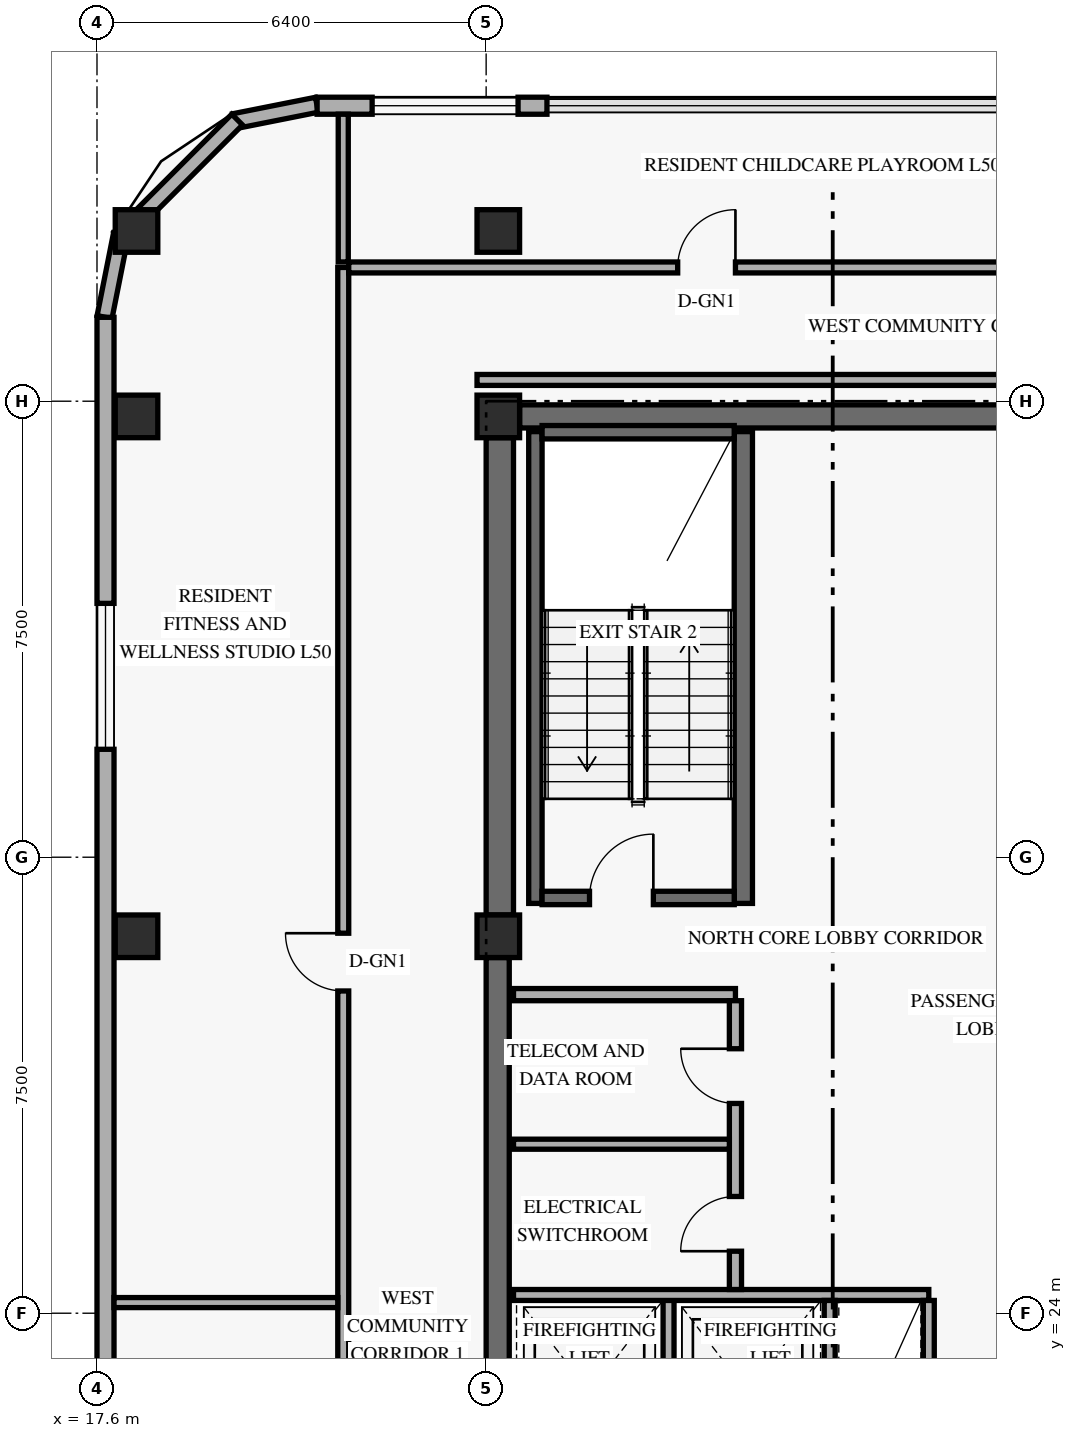
"""IFC4 building model, lengths in metres.
Left out: names, types, materials, properties, quantities, classifications, styles, units other than length and angle.
Written with IfcOpenShell. Run it as: python <this file> out.ifc"""

import sys

from ifc_helpers import new_model, si_unit, direction, frame, frame_2d, origin, origin_2d, place, context, subcontext, project, spatial, rectangle, extrude, element, fill, save


model = new_model("IFC4")
c1 = context("Model", 3, precision=1e-05, world=origin(), true_north=direction((0.0, 1.0)))
c2 = subcontext(c1, "Body", "Model", "MODEL_VIEW")
j1 = project(units=[si_unit("LENGTHUNIT", "METRE"), si_unit("PLANEANGLEUNIT", "RADIAN")], contexts=[c1])
p1 = place(None, origin())
s1 = spatial("IfcSite", under=j1, at=p1, CompositionType="ELEMENT")
p2 = place(p1, origin())
s2 = spatial("IfcBuilding", under=s1, at=p2, CompositionType="ELEMENT")
p3 = place(p2, frame((0.0, 0.0, 192.0)))
s3 = spatial("IfcBuildingStorey", under=s2, at=p3, CompositionType="ELEMENT", Elevation=192.0)
p4 = place(p3, frame((24.19, 17.9, 0.0), z_axis=(0.0, 0.0, 1.0), x_axis=(0.0, 1.0, 0.0)))
e1 = element("IfcWall", 1, at=p4, inside=s3, PredefinedType="SHEAR", context=c2, shape_type="SweptSolid", body=[
    extrude(rectangle(XDim=11.95, YDim=0.38, at=frame_2d((5.975, 0.0))), origin(), (0.0, 0.0, 1.0), 3.348),
])
p5 = place(p3, frame((24.225, 30.55, 0.0), z_axis=(0.0, 0.0, 1.0), x_axis=(0.0, 1.0, 0.0)))
e2 = element("IfcWall", 2, at=p5, inside=s3, PredefinedType="SHEAR", context=c2, shape_type="SweptSolid", body=[
    extrude(rectangle(XDim=7.85, YDim=0.45, at=frame_2d((3.925, 0.0))), origin(), (0.0, 0.0, 1.0), 3.348),
])
p6 = place(p3, frame((24.55, 38.75, 0.0), z_axis=(0.0, 0.0, 1.0), x_axis=(1.0, 0.0, 0.0)))
e3 = element("IfcWall", 3, at=p6, inside=s3, PredefinedType="SHEAR", context=c2, shape_type="SweptSolid", body=[
    extrude(rectangle(XDim=10.3, YDim=0.38, at=frame_2d((5.15, 0.0))), origin(), (0.0, 0.0, 1.0), 3.96),
])
p7 = place(p3, frame((24.81, 30.74, 0.0), z_axis=(0.0, 0.0, 1.0), x_axis=(0.0, 1.0, 0.0)))
e4 = element("IfcWall", 4, at=p7, inside=s3, PredefinedType="SHEAR", context=c2, shape_type="SweptSolid", body=[
    extrude(rectangle(XDim=7.76, YDim=0.22, at=frame_2d((3.88, 0.0))), origin(), (0.0, 0.0, 1.0), 3.96),
])
p8 = place(p3, frame((28.23, 30.74, 0.0), z_axis=(0.0, 0.0, 1.0), x_axis=(0.0, 1.0, 0.0)))
e5 = element("IfcWall", 5, at=p8, inside=s3, PredefinedType="SHEAR", context=c2, shape_type="SweptSolid", body=[
    extrude(rectangle(XDim=7.76, YDim=0.3, at=frame_2d((3.88, 0.0))), origin(), (0.0, 0.0, 1.0), 3.96),
])
p9 = place(p3, frame((24.92, 30.83, 0.0), z_axis=(0.0, 0.0, 1.0), x_axis=(1.0, 0.0, 0.0)))
e6 = element("IfcWall", 6, at=p9, inside=s3, PredefinedType="SHEAR", context=c2, shape_type="SweptSolid", body=[
    extrude(rectangle(XDim=3.16, YDim=0.22, at=frame_2d((1.58, 0.0))), origin(), (0.0, 0.0, 1.0), 3.96),
])
p10 = place(p9, frame((0.78, 0.0, 0.0)))
e7 = element("IfcOpeningElement", 7, at=p10, cuts=e6, PredefinedType="OPENING", context=c2, shape_type="SweptSolid", body=[
    extrude(rectangle(XDim=1.05, YDim=2.15, at=frame_2d((0.525, 1.075))), frame((0.0, 0.12, 0.0), z_axis=(0.0, -1.0, 0.0), x_axis=(1.0, 0.0, 0.0)), (0.0, 0.0, 1.0), 0.24),
])
p11 = place(p3, frame((24.92, 38.49, 0.0), z_axis=(0.0, 0.0, 1.0), x_axis=(1.0, 0.0, 0.0)))
e8 = element("IfcWall", 8, at=p11, inside=s3, PredefinedType="SHEAR", context=c2, shape_type="SweptSolid", body=[
    extrude(rectangle(XDim=3.16, YDim=0.22, at=frame_2d((1.58, 0.0))), origin(), (0.0, 0.0, 1.0), 3.96),
])
for number, where, z_axis, x_axis in (
    (9, (18.25, 30.2, 0.0), (0.0, 0.0, 1.0), (1.0, 0.0, 0.0)),
    (10, (18.25, 38.75, 0.0), (0.0, 0.0, 1.0), (1.0, 0.0, 0.0)),
    (11, (18.25, 41.8, 0.0), (0.0, 0.0, 1.0), (1.0, 0.0, 0.0)),
    (12, (24.2, 30.2, 0.0), (0.0, 0.0, 1.0), (1.0, 0.0, 0.0)),
    (13, (24.2, 38.75, 0.0), (0.0, 0.0, 1.0), (1.0, 0.0, 0.0)),
    (14, (24.2, 41.8, 0.0), (0.0, 0.0, 1.0), (1.0, 0.0, 0.0)),
):
    element("IfcColumn", number, at=place(p3, frame(where, z_axis=z_axis, x_axis=x_axis)), inside=s3, PredefinedType="COLUMN", context=c2, shape_type="SweptSolid", body=[
        extrude(rectangle(XDim=0.7, YDim=0.7, at=origin_2d()), origin(), (0.0, 0.0, 1.0), 4.2),
    ])
p12 = place(p3, frame((21.217, 43.876, 0.0), z_axis=(0.0, 0.0, 1.0), x_axis=(-0.980809899341, -0.19496651342, 0.0)))
e15 = element("IfcWall", 15, at=p12, inside=s3, PredefinedType="SOLIDWALL", context=c2, shape_type="SweptSolid", body=[
    extrude(rectangle(XDim=1.389, YDim=0.25, at=frame_2d((0.694, 0.0))), origin(), (0.0, 0.0, 1.0), 3.96),
])
p13 = place(p3, frame((19.905, 43.632, 0.0), z_axis=(0.0, 0.0, 1.0), x_axis=(-0.707106781187, -0.707106781187, 0.0)))
e16 = element("IfcWall", 16, at=p13, inside=s3, PredefinedType="SOLIDWALL", context=c2, shape_type="SweptSolid", body=[
    extrude(rectangle(XDim=2.739, YDim=0.25, at=frame_2d((1.37, 0.0))), origin(), (0.0, 0.0, 1.0), 3.96),
])
p14 = place(p3, frame((17.995, 41.746, 0.0), z_axis=(0.0, 0.0, 1.0), x_axis=(-0.195135625965, -0.9807762678, 0.0)))
e17 = element("IfcWall", 17, at=p14, inside=s3, PredefinedType="SOLIDWALL", context=c2, shape_type="SweptSolid", body=[
    extrude(rectangle(XDim=1.389, YDim=0.25, at=frame_2d((0.694, 0.0))), origin(), (0.0, 0.0, 1.0), 3.96),
])
p15 = place(p3, frame((25.0, 43.86, 0.0), z_axis=(0.0, 0.0, 1.0), x_axis=(-1.0, 0.0, 0.0)))
e18 = element("IfcWall", 18, at=p15, inside=s3, PredefinedType="SOLIDWALL", context=c2, shape_type="SweptSolid", body=[
    extrude(rectangle(XDim=3.78, YDim=0.28, at=frame_2d((1.89, 0.0))), origin(), (0.0, 0.0, 1.0), 3.96),
])
p16 = place(p15, frame((0.475, 0.0, 0.85)))
e19 = element("IfcOpeningElement", 19, at=p16, cuts=e18, PredefinedType="OPENING", context=c2, shape_type="SweptSolid", body=[
    extrude(rectangle(XDim=2.4, YDim=1.9, at=frame_2d((1.2, 0.95))), frame((0.0, 0.15, 0.0), z_axis=(0.0, -1.0, 0.0), x_axis=(1.0, 0.0, 0.0)), (0.0, 0.0, 1.0), 0.3),
])
p17 = place(p3, frame((17.74, 40.38, 0.0), z_axis=(0.0, 0.0, 1.0), x_axis=(0.0, -1.0, 0.0)))
e20 = element("IfcWall", 20, at=p17, inside=s3, PredefinedType="SOLIDWALL", context=c2, shape_type="SweptSolid", body=[
    extrude(rectangle(XDim=32.76, YDim=0.28, at=frame_2d((16.38, 0.0))), origin(), (0.0, 0.0, 1.0), 3.96),
])
p18 = place(p17, frame((25.78, 0.0, 0.85)))
e21 = element("IfcOpeningElement", 21, at=p18, cuts=e20, PredefinedType="OPENING", context=c2, shape_type="SweptSolid", body=[
    extrude(rectangle(XDim=2.4, YDim=1.9, at=frame_2d((1.2, 0.95))), frame((0.0, 0.15, 0.0), z_axis=(0.0, -1.0, 0.0), x_axis=(1.0, 0.0, 0.0)), (0.0, 0.0, 1.0), 0.3),
])
p19 = place(p17, frame((4.705, 0.0, 0.85)))
e22 = element("IfcOpeningElement", 22, at=p19, cuts=e20, PredefinedType="OPENING", context=c2, shape_type="SweptSolid", body=[
    extrude(rectangle(XDim=2.4, YDim=1.9, at=frame_2d((1.2, 0.95))), frame((0.0, 0.15, 0.0), z_axis=(0.0, -1.0, 0.0), x_axis=(1.0, 0.0, 0.0)), (0.0, 0.0, 1.0), 0.3),
])
p20 = place(p3, frame((27.0, 21.19, 0.0), z_axis=(0.0, 0.0, 1.0), x_axis=(0.0, 1.0, 0.0)))
e23 = element("IfcWall", 23, at=p20, inside=s3, PredefinedType="STANDARD", context=c2, shape_type="SweptSolid", body=[
    extrude(rectangle(XDim=3.11, YDim=0.18, at=frame_2d((1.555, 0.0))), origin(), (0.0, 0.0, 1.0), 3.96),
])
p21 = place(p3, frame((24.45, 24.3, 0.0), z_axis=(0.0, 0.0, 1.0), x_axis=(1.0, 0.0, 0.0)))
e24 = element("IfcWall", 24, at=p21, inside=s3, PredefinedType="STANDARD", context=c2, shape_type="SweptSolid", body=[
    extrude(rectangle(XDim=6.83, YDim=0.18, at=frame_2d((3.415, 0.0))), origin(), (0.0, 0.0, 1.0), 3.96),
])
for number, where, z_axis, x_axis in (
    (25, (29.65, 21.19, 0.0), (0.0, 0.0, 1.0), (0.0, 1.0, 0.0)),
    (26, (31.28, 21.19, 0.0), (0.0, 0.0, 1.0), (0.0, 1.0, 0.0)),
):
    element("IfcWall", number, at=place(p3, frame(where, z_axis=z_axis, x_axis=x_axis)), inside=s3, PredefinedType="STANDARD", context=c2, shape_type="SweptSolid", body=[
        extrude(rectangle(XDim=3.02, YDim=0.18, at=frame_2d((1.51, 0.0))), origin(), (0.0, 0.0, 1.0), 3.96),
    ])
p22 = place(p3, frame((24.45, 29.24, 0.0), z_axis=(0.0, 0.0, 1.0), x_axis=(1.0, 0.0, 0.0)))
e27 = element("IfcWall", 27, at=p22, inside=s3, PredefinedType="STANDARD", context=c2, shape_type="SweptSolid", body=[
    extrude(rectangle(XDim=3.65, YDim=0.2, at=frame_2d((1.825, 0.0))), origin(), (0.0, 0.0, 1.0), 3.96),
])
p23 = place(p3, frame((28.1, 24.39, 0.0), z_axis=(0.0, 0.0, 1.0), x_axis=(0.0, 1.0, 0.0)))
e28 = element("IfcWall", 28, at=p23, inside=s3, PredefinedType="STANDARD", context=c2, shape_type="SweptSolid", body=[
    extrude(rectangle(XDim=4.75, YDim=0.2, at=frame_2d((2.375, 0.0))), origin(), (0.0, 0.0, 1.0), 3.96),
])
p24 = place(p23, frame((0.63, 0.0, 0.0)))
e29 = element("IfcOpeningElement", 29, at=p24, cuts=e28, PredefinedType="OPENING", context=c2, shape_type="SweptSolid", body=[
    extrude(rectangle(XDim=0.9, YDim=2.1, at=frame_2d((0.45, 1.05))), frame((0.0, 0.11, 0.0), z_axis=(0.0, -1.0, 0.0), x_axis=(1.0, 0.0, 0.0)), (0.0, 0.0, 1.0), 0.22),
])
p25 = place(p23, frame((3.06, 0.0, 0.0)))
e30 = element("IfcOpeningElement", 30, at=p25, cuts=e28, PredefinedType="OPENING", context=c2, shape_type="SweptSolid", body=[
    extrude(rectangle(XDim=0.9, YDim=2.1, at=frame_2d((0.45, 1.05))), frame((0.0, 0.11, 0.0), z_axis=(0.0, -1.0, 0.0), x_axis=(1.0, 0.0, 0.0)), (0.0, 0.0, 1.0), 0.22),
])
p26 = place(p3, frame((24.45, 26.78, 0.0), z_axis=(0.0, 0.0, 1.0), x_axis=(1.0, 0.0, 0.0)))
e31 = element("IfcWall", 31, at=p26, inside=s3, PredefinedType="PARTITIONING", context=c2, shape_type="SweptSolid", body=[
    extrude(rectangle(XDim=3.55, YDim=0.165, at=frame_2d((1.775, 0.0))), origin(), (0.0, 0.0, 1.0), 3.96),
])
p27 = place(p3, frame((21.65, 6.8, 0.0), z_axis=(0.0, 0.0, 1.0), x_axis=(0.0, 1.0, 0.0)))
e32 = element("IfcWall", 32, at=p27, inside=s3, PredefinedType="STANDARD", context=c2, shape_type="SweptSolid", body=[
    extrude(rectangle(XDim=34.4, YDim=0.18, at=frame_2d((17.2, 0.0))), origin(), (0.0, 0.0, 1.0), 3.33),
])
p28 = place(p27, frame((7.5, 0.0, 0.0)))
e33 = element("IfcOpeningElement", 33, at=p28, cuts=e32, PredefinedType="OPENING", context=c2, shape_type="SweptSolid", body=[
    extrude(rectangle(XDim=0.95, YDim=2.15, at=frame_2d((0.475, 1.075))), frame((0.0, 0.1, 0.0), z_axis=(0.0, -1.0, 0.0), x_axis=(1.0, 0.0, 0.0)), (0.0, 0.0, 1.0), 0.2),
])
p29 = place(p27, frame((22.5, 0.0, 0.0)))
e34 = element("IfcOpeningElement", 34, at=p29, cuts=e32, PredefinedType="OPENING", context=c2, shape_type="SweptSolid", body=[
    extrude(rectangle(XDim=0.95, YDim=2.15, at=frame_2d((0.475, 1.075))), frame((0.0, 0.1, 0.0), z_axis=(0.0, -1.0, 0.0), x_axis=(1.0, 0.0, 0.0)), (0.0, 0.0, 1.0), 0.2),
])
p30 = place(p3, frame((21.74, 41.2, 0.0), z_axis=(0.0, 0.0, 1.0), x_axis=(1.0, 0.0, 0.0)))
e35 = element("IfcWall", 35, at=p30, inside=s3, PredefinedType="STANDARD", context=c2, shape_type="SweptSolid", body=[
    extrude(rectangle(XDim=15.57, YDim=0.18, at=frame_2d((7.785, 0.0))), origin(), (0.0, 0.0, 1.0), 3.33),
])
p31 = place(p30, frame((5.41, 0.0, 0.0)))
e36 = element("IfcOpeningElement", 36, at=p31, cuts=e35, PredefinedType="OPENING", context=c2, shape_type="SweptSolid", body=[
    extrude(rectangle(XDim=0.95, YDim=2.15, at=frame_2d((0.475, 1.075))), frame((0.0, 0.1, 0.0), z_axis=(0.0, -1.0, 0.0), x_axis=(1.0, 0.0, 0.0)), (0.0, 0.0, 1.0), 0.2),
])
p32 = place(p3, frame((23.85, 39.35, 0.0), z_axis=(0.0, 0.0, 1.0), x_axis=(1.0, 0.0, 0.0)))
e37 = element("IfcWall", 37, at=p32, inside=s3, PredefinedType="STANDARD", context=c2, shape_type="SweptSolid", body=[
    extrude(rectangle(XDim=11.48, YDim=0.18, at=frame_2d((5.74, 0.0))), origin(), (0.0, 0.0, 1.0), 3.33),
])
p33 = place(p3, frame((21.65, 41.29, 0.0), z_axis=(0.0, 0.0, 1.0), x_axis=(0.0, 1.0, 0.0)))
e38 = element("IfcWall", 38, at=p33, inside=s3, PredefinedType="PARTITIONING", context=c2, shape_type="SweptSolid", body=[
    extrude(rectangle(XDim=2.43, YDim=0.165, at=frame_2d((1.215, 0.0))), origin(), (0.0, 0.0, 1.0), 3.479),
])
p34 = place(p3, frame((17.88, 24.175, 0.0), z_axis=(0.0, 0.0, 1.0), x_axis=(1.0, 0.0, 0.0)))
e39 = element("IfcWall", 39, at=p34, inside=s3, PredefinedType="PARTITIONING", context=c2, shape_type="SweptSolid", body=[
    extrude(rectangle(XDim=3.68, YDim=0.165, at=frame_2d((1.84, 0.0))), origin(), (0.0, 0.0, 1.0), 3.479),
])
p35 = place(p16, origin())
e40 = element("IfcWindow", 40, at=p35, inside=s3, PartitioningType="SINGLE_PANEL", PredefinedType="WINDOW", context=c2, shape_type="SweptSolid", body=[
    extrude(rectangle(XDim=2.4, YDim=1.9, at=frame_2d((1.2, 0.95))), frame((0.0, 0.03, 0.0), z_axis=(0.0, -1.0, 0.0), x_axis=(1.0, 0.0, 0.0)), (0.0, 0.0, 1.0), 0.06),
])
fill(e19, e40)
p36 = place(p19, origin())
e41 = element("IfcWindow", 41, at=p36, inside=s3, PartitioningType="SINGLE_PANEL", PredefinedType="WINDOW", context=c2, shape_type="SweptSolid", body=[
    extrude(rectangle(XDim=2.4, YDim=1.9, at=frame_2d((1.2, 0.95))), frame((0.0, 0.03, 0.0), z_axis=(0.0, -1.0, 0.0), x_axis=(1.0, 0.0, 0.0)), (0.0, 0.0, 1.0), 0.06),
])
fill(e22, e41)
p37 = place(p10, origin())
e42 = element("IfcDoor", 42, at=p37, inside=s3, OperationType="SINGLE_SWING_RIGHT", PredefinedType="DOOR", context=c2, shape_type="SweptSolid", body=[
    extrude(rectangle(XDim=1.05, YDim=2.15, at=frame_2d((0.525, 1.075))), frame((0.0, 0.025, 0.0), z_axis=(0.0, -1.0, 0.0), x_axis=(1.0, 0.0, 0.0)), (0.0, 0.0, 1.0), 0.05),
])
fill(e7, e42)
p38 = place(p24, origin())
e43 = element("IfcDoor", 43, at=p38, inside=s3, OperationType="SINGLE_SWING_LEFT", PredefinedType="DOOR", context=c2, shape_type="SweptSolid", body=[
    extrude(rectangle(XDim=0.9, YDim=2.1, at=frame_2d((0.45, 1.05))), frame((0.0, 0.025, 0.0), z_axis=(0.0, -1.0, 0.0), x_axis=(1.0, 0.0, 0.0)), (0.0, 0.0, 1.0), 0.05),
])
fill(e29, e43)
p39 = place(p25, origin())
e44 = element("IfcDoor", 44, at=p39, inside=s3, OperationType="SINGLE_SWING_RIGHT", PredefinedType="DOOR", context=c2, shape_type="SweptSolid", body=[
    extrude(rectangle(XDim=0.9, YDim=2.1, at=frame_2d((0.45, 1.05))), frame((0.0, 0.025, 0.0), z_axis=(0.0, -1.0, 0.0), x_axis=(1.0, 0.0, 0.0)), (0.0, 0.0, 1.0), 0.05),
])
fill(e30, e44)
p40 = place(p29, origin())
e45 = element("IfcDoor", 45, at=p40, inside=s3, OperationType="SINGLE_SWING_RIGHT", PredefinedType="DOOR", context=c2, shape_type="SweptSolid", body=[
    extrude(rectangle(XDim=0.95, YDim=2.15, at=frame_2d((0.475, 1.075))), frame((0.0, 0.025, 0.0), z_axis=(0.0, -1.0, 0.0), x_axis=(1.0, 0.0, 0.0)), (0.0, 0.0, 1.0), 0.05),
])
fill(e34, e45)
p41 = place(p31, origin())
e46 = element("IfcDoor", 46, at=p41, inside=s3, OperationType="SINGLE_SWING_RIGHT", PredefinedType="DOOR", context=c2, shape_type="SweptSolid", body=[
    extrude(rectangle(XDim=0.95, YDim=2.15, at=frame_2d((0.475, 1.075))), frame((0.0, 0.025, 0.0), z_axis=(0.0, -1.0, 0.0), x_axis=(1.0, 0.0, 0.0)), (0.0, 0.0, 1.0), 0.05),
])
fill(e36, e46)
save(model, sys.argv[1])
